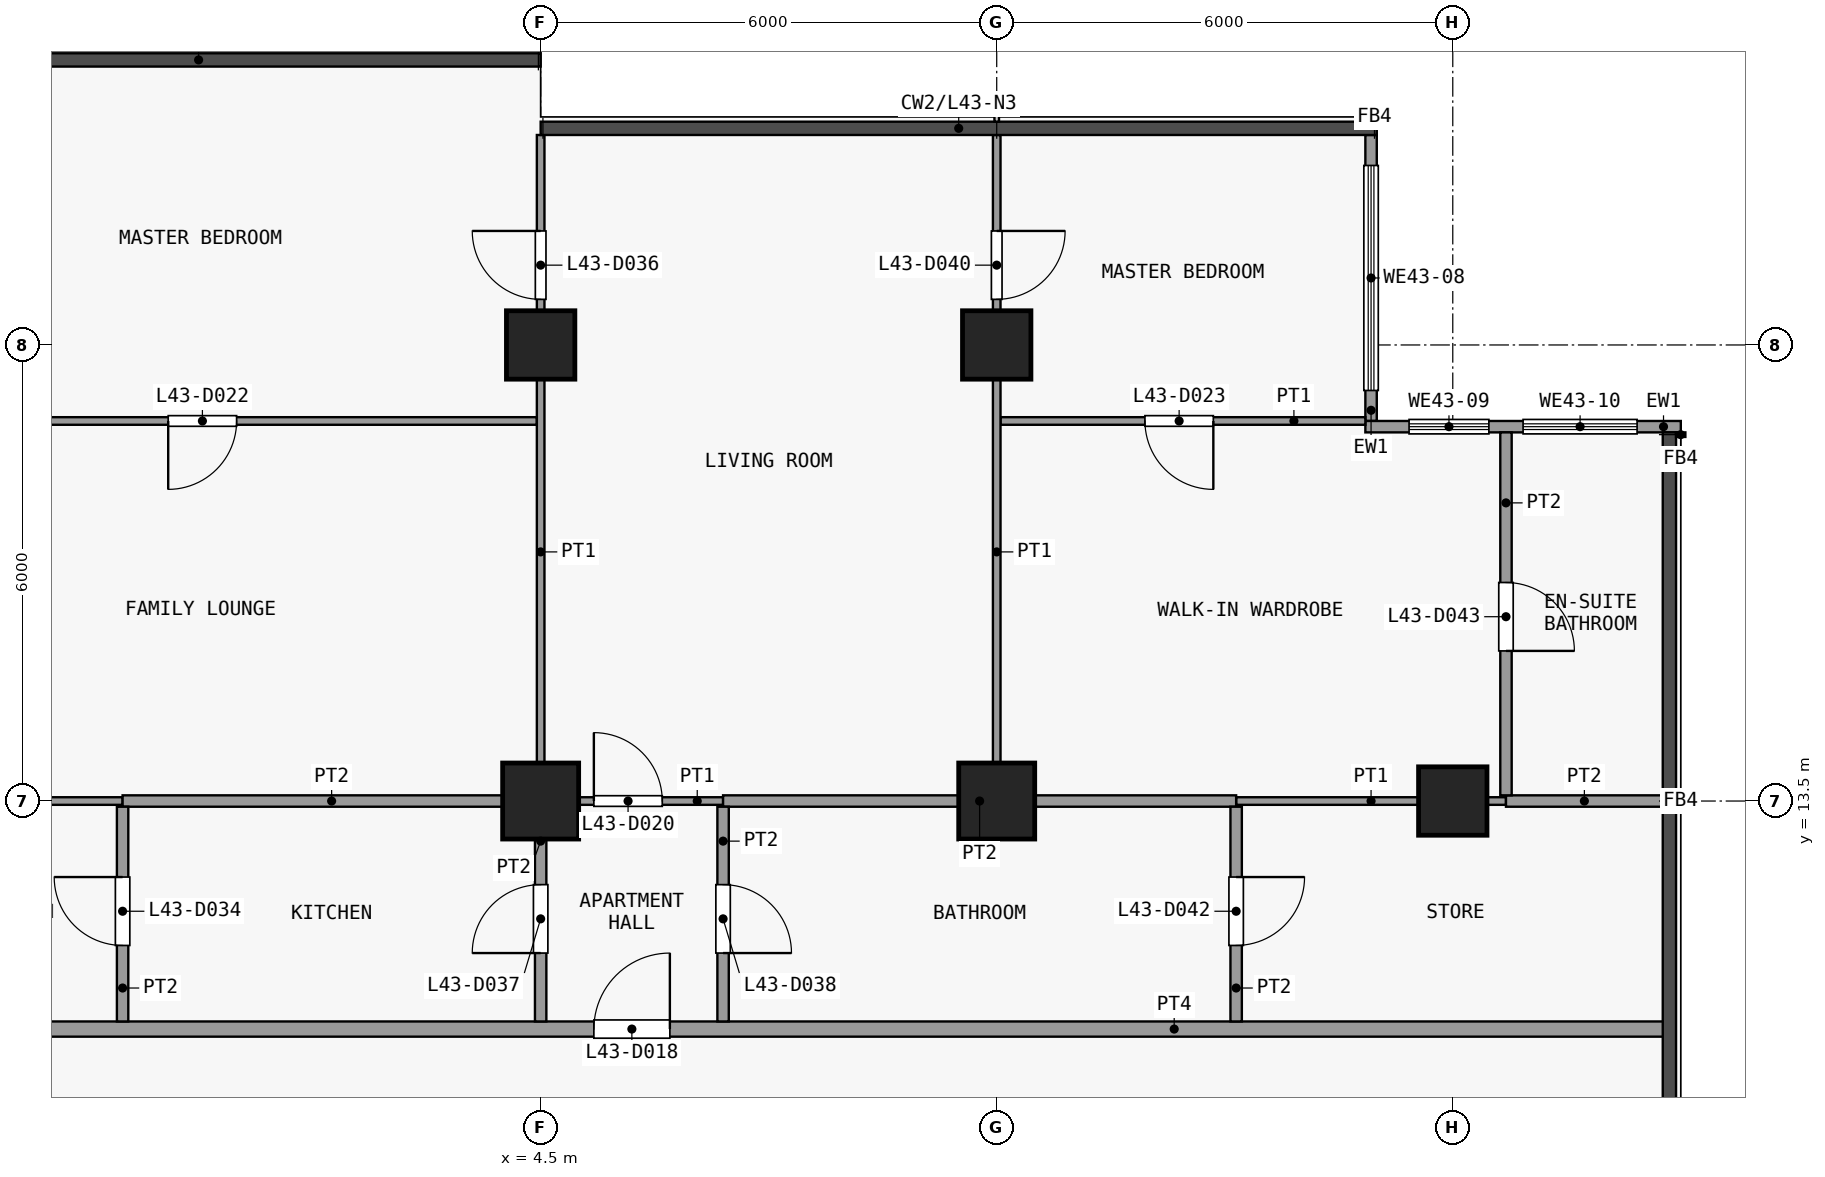
"""IFC4 building model, lengths in metres.
Left out: names, types, materials, properties, quantities, classifications, styles, units other than length and angle.
Written with IfcOpenShell. Run it as: python <this file> out.ifc"""

import sys

from ifc_helpers import new_model, si_unit, direction, frame, frame_2d, origin, origin_2d, place, context, subcontext, project, spatial, rectangle, extrude, element, fill, save


model = new_model("IFC4")
c1 = context("Model", 3, precision=1e-05, world=origin(), true_north=direction((0.0, 1.0)))
c2 = subcontext(c1, "Body", "Model", "MODEL_VIEW")
j1 = project(units=[si_unit("LENGTHUNIT", "METRE"), si_unit("PLANEANGLEUNIT", "RADIAN")], contexts=[c1])
p1 = place(None, origin())
s1 = spatial("IfcSite", under=j1, at=p1, CompositionType="ELEMENT")
p2 = place(p1, origin())
s2 = spatial("IfcBuilding", under=s1, at=p2, CompositionType="ELEMENT")
p3 = place(p2, frame((0.0, 0.0, 174.5)))
s3 = spatial("IfcBuildingStorey", under=s2, at=p3, CompositionType="ELEMENT", Elevation=174.5)
p4 = place(p3, frame((4.5, 13.5, 0.0), z_axis=(0.0, 0.0, 1.0), x_axis=(1.0, 0.0, 0.0)))
e1 = element("IfcColumn", 1, at=p4, inside=s3, PredefinedType="COLUMN", context=c2, shape_type="SweptSolid", body=[
    extrude(rectangle(XDim=1.0, YDim=1.0, at=origin_2d()), origin(), (0.0, 0.0, 1.0), 3.6),
])
p5 = place(p3, frame((4.5, 19.5, 0.0), z_axis=(0.0, 0.0, 1.0), x_axis=(1.0, 0.0, 0.0)))
e2 = element("IfcColumn", 2, at=p5, inside=s3, PredefinedType="COLUMN", context=c2, shape_type="SweptSolid", body=[
    extrude(rectangle(XDim=0.9, YDim=0.9, at=origin_2d()), origin(), (0.0, 0.0, 1.0), 3.6),
])
p6 = place(p3, frame((10.5, 13.5, 0.0), z_axis=(0.0, 0.0, 1.0), x_axis=(1.0, 0.0, 0.0)))
e3 = element("IfcColumn", 3, at=p6, inside=s3, PredefinedType="COLUMN", context=c2, shape_type="SweptSolid", body=[
    extrude(rectangle(XDim=1.0, YDim=1.0, at=origin_2d()), origin(), (0.0, 0.0, 1.0), 3.6),
])
for number, where, z_axis, x_axis in (
    (4, (10.5, 19.5, 0.0), (0.0, 0.0, 1.0), (1.0, 0.0, 0.0)),
    (5, (16.5, 13.5, 0.0), (0.0, 0.0, 1.0), (1.0, 0.0, 0.0)),
):
    element("IfcColumn", number, at=place(p3, frame(where, z_axis=z_axis, x_axis=x_axis)), inside=s3, PredefinedType="COLUMN", context=c2, shape_type="SweptSolid", body=[
        extrude(rectangle(XDim=0.9, YDim=0.9, at=origin_2d()), origin(), (0.0, 0.0, 1.0), 3.6),
    ])
p7 = place(p3, frame((15.425, 22.262, 0.0), z_axis=(0.0, 0.0, 1.0), x_axis=(0.0, -1.0, 0.0)))
e6 = element("IfcWall", 6, at=p7, inside=s3, PredefinedType="SOLIDWALL", context=c2, shape_type="SweptSolid", body=[
    extrude(rectangle(XDim=3.762, YDim=0.15, at=frame_2d((1.881, 0.0))), origin(), (0.0, 0.0, 1.0), 3.3),
])
p8 = place(p7, frame((0.401, 0.0, 0.9)))
e7 = element("IfcOpeningElement", 7, at=p8, cuts=e6, PredefinedType="OPENING", context=c2, shape_type="SweptSolid", body=[
    extrude(rectangle(XDim=2.96, YDim=2.4, at=frame_2d((1.48, 1.2))), frame((0.0, 0.085, 0.0), z_axis=(0.0, -1.0, 0.0), x_axis=(1.0, 0.0, 0.0)), (0.0, 0.0, 1.0), 0.17),
])
p9 = place(p3, frame((15.35, 18.425, 0.0), z_axis=(0.0, 0.0, 1.0), x_axis=(1.0, 0.0, 0.0)))
e8 = element("IfcWall", 8, at=p9, inside=s3, PredefinedType="SOLIDWALL", context=c2, shape_type="SweptSolid", body=[
    extrude(rectangle(XDim=4.15, YDim=0.15, at=frame_2d((2.075, 0.0))), origin(), (0.0, 0.0, 1.0), 3.3),
])
p10 = place(p9, frame((0.575, 0.0, 0.9)))
e9 = element("IfcOpeningElement", 9, at=p10, cuts=e8, PredefinedType="OPENING", context=c2, shape_type="SweptSolid", body=[
    extrude(rectangle(XDim=1.05, YDim=2.4, at=frame_2d((0.525, 1.2))), frame((0.0, 0.085, 0.0), z_axis=(0.0, -1.0, 0.0), x_axis=(1.0, 0.0, 0.0)), (0.0, 0.0, 1.0), 0.17),
])
p11 = place(p9, frame((2.075, 0.0, 0.9)))
e10 = element("IfcOpeningElement", 10, at=p11, cuts=e8, PredefinedType="OPENING", context=c2, shape_type="SweptSolid", body=[
    extrude(rectangle(XDim=1.5, YDim=2.4, at=frame_2d((0.75, 1.2))), frame((0.0, 0.085, 0.0), z_axis=(0.0, -1.0, 0.0), x_axis=(1.0, 0.0, 0.0)), (0.0, 0.0, 1.0), 0.17),
])
p12 = place(p3, frame((-19.35, 10.5, 0.0), z_axis=(0.0, 0.0, 1.0), x_axis=(1.0, 0.0, 0.0)))
e11 = element("IfcWall", 11, at=p12, inside=s3, PredefinedType="PARTITIONING", context=c2, shape_type="SweptSolid", body=[
    extrude(rectangle(XDim=38.7, YDim=0.2, at=frame_2d((19.35, 0.0))), origin(), (0.0, 0.0, 1.0), 3.3),
])
p13 = place(p12, frame((10.55, 0.0, 0.0)))
e12 = element("IfcOpeningElement", 12, at=p13, cuts=e11, PredefinedType="OPENING", context=c2, shape_type="SweptSolid", body=[
    extrude(rectangle(XDim=1.0, YDim=2.1, at=frame_2d((0.5, 1.05))), frame((0.0, 0.11, 0.0), z_axis=(0.0, -1.0, 0.0), x_axis=(1.0, 0.0, 0.0)), (0.0, 0.0, 1.0), 0.22),
])
p14 = place(p12, frame((24.55, 0.0, 0.0)))
e13 = element("IfcOpeningElement", 13, at=p14, cuts=e11, PredefinedType="OPENING", context=c2, shape_type="SweptSolid", body=[
    extrude(rectangle(XDim=1.0, YDim=2.1, at=frame_2d((0.5, 1.05))), frame((0.0, 0.11, 0.0), z_axis=(0.0, -1.0, 0.0), x_axis=(1.0, 0.0, 0.0)), (0.0, 0.0, 1.0), 0.22),
])
p15 = place(p3, frame((-4.5, 13.5, 0.0), z_axis=(0.0, 0.0, 1.0), x_axis=(1.0, 0.0, 0.0)))
e14 = element("IfcWall", 14, at=p15, inside=s3, PredefinedType="PARTITIONING", context=c2, shape_type="SweptSolid", body=[
    extrude(rectangle(XDim=3.5, YDim=0.1, at=frame_2d((1.75, 0.0))), origin(), (0.0, 0.0, 1.0), 3.3),
])
p16 = place(p3, frame((4.5, 13.5, 0.0), z_axis=(0.0, 0.0, 1.0), x_axis=(1.0, 0.0, 0.0)))
e15 = element("IfcWall", 15, at=p16, inside=s3, PredefinedType="PARTITIONING", context=c2, shape_type="SweptSolid", body=[
    extrude(rectangle(XDim=2.4, YDim=0.1, at=frame_2d((1.2, 0.0))), origin(), (0.0, 0.0, 1.0), 3.3),
])
p17 = place(p16, frame((0.7, 0.0, 0.0)))
e16 = element("IfcOpeningElement", 16, at=p17, cuts=e15, PredefinedType="OPENING", context=c2, shape_type="SweptSolid", body=[
    extrude(rectangle(XDim=0.9, YDim=2.1, at=frame_2d((0.45, 1.05))), frame((0.0, 0.06, 0.0), z_axis=(0.0, -1.0, 0.0), x_axis=(1.0, 0.0, 0.0)), (0.0, 0.0, 1.0), 0.12),
])
p18 = place(p3, frame((13.65, 13.5, 0.0), z_axis=(0.0, 0.0, 1.0), x_axis=(1.0, 0.0, 0.0)))
e17 = element("IfcWall", 17, at=p18, inside=s3, PredefinedType="PARTITIONING", context=c2, shape_type="SweptSolid", body=[
    extrude(rectangle(XDim=3.55, YDim=0.1, at=frame_2d((1.775, 0.0))), origin(), (0.0, 0.0, 1.0), 3.3),
])
p19 = place(p3, frame((-1.0, 13.5, 0.0), z_axis=(0.0, 0.0, 1.0), x_axis=(1.0, 0.0, 0.0)))
e18 = element("IfcWall", 18, at=p19, inside=s3, PredefinedType="PARTITIONING", context=c2, shape_type="SweptSolid", body=[
    extrude(rectangle(XDim=5.5, YDim=0.15, at=frame_2d((2.75, 0.0))), origin(), (0.0, 0.0, 1.0), 3.3),
])
p20 = place(p3, frame((6.9, 13.5, 0.0), z_axis=(0.0, 0.0, 1.0), x_axis=(1.0, 0.0, 0.0)))
e19 = element("IfcWall", 19, at=p20, inside=s3, PredefinedType="PARTITIONING", context=c2, shape_type="SweptSolid", body=[
    extrude(rectangle(XDim=6.75, YDim=0.15, at=frame_2d((3.375, 0.0))), origin(), (0.0, 0.0, 1.0), 3.3),
])
p21 = place(p3, frame((17.2, 13.5, 0.0), z_axis=(0.0, 0.0, 1.0), x_axis=(1.0, 0.0, 0.0)))
e20 = element("IfcWall", 20, at=p21, inside=s3, PredefinedType="PARTITIONING", context=c2, shape_type="SweptSolid", body=[
    extrude(rectangle(XDim=2.062, YDim=0.15, at=frame_2d((1.031, 0.0))), origin(), (0.0, 0.0, 1.0), 3.3),
])
p22 = place(p3, frame((-4.4, 18.5, 0.0), z_axis=(0.0, 0.0, 1.0), x_axis=(1.0, 0.0, 0.0)))
e21 = element("IfcWall", 21, at=p22, inside=s3, PredefinedType="PARTITIONING", context=c2, shape_type="SweptSolid", body=[
    extrude(rectangle(XDim=8.85, YDim=0.1, at=frame_2d((4.425, 0.0))), origin(), (0.0, 0.0, 1.0), 3.3),
])
p23 = place(p22, frame((4.0, 0.0, 0.0)))
e22 = element("IfcOpeningElement", 22, at=p23, cuts=e21, PredefinedType="OPENING", context=c2, shape_type="SweptSolid", body=[
    extrude(rectangle(XDim=0.9, YDim=2.1, at=frame_2d((0.45, 1.05))), frame((0.0, 0.06, 0.0), z_axis=(0.0, -1.0, 0.0), x_axis=(1.0, 0.0, 0.0)), (0.0, 0.0, 1.0), 0.12),
])
p24 = place(p3, frame((10.55, 18.5, 0.0), z_axis=(0.0, 0.0, 1.0), x_axis=(1.0, 0.0, 0.0)))
e23 = element("IfcWall", 23, at=p24, inside=s3, PredefinedType="PARTITIONING", context=c2, shape_type="SweptSolid", body=[
    extrude(rectangle(XDim=4.8, YDim=0.1, at=frame_2d((2.4, 0.0))), origin(), (0.0, 0.0, 1.0), 3.3),
])
p25 = place(p24, frame((1.9, 0.0, 0.0)))
e24 = element("IfcOpeningElement", 24, at=p25, cuts=e23, PredefinedType="OPENING", context=c2, shape_type="SweptSolid", body=[
    extrude(rectangle(XDim=0.9, YDim=2.1, at=frame_2d((0.45, 1.05))), frame((0.0, 0.06, 0.0), z_axis=(0.0, -1.0, 0.0), x_axis=(1.0, 0.0, 0.0)), (0.0, 0.0, 1.0), 0.12),
])
p26 = place(p3, frame((-1.0, 10.6, 0.0), z_axis=(0.0, 0.0, 1.0), x_axis=(0.0, 1.0, 0.0)))
e25 = element("IfcWall", 25, at=p26, inside=s3, PredefinedType="PARTITIONING", context=c2, shape_type="SweptSolid", body=[
    extrude(rectangle(XDim=2.825, YDim=0.15, at=frame_2d((1.413, 0.0))), origin(), (0.0, 0.0, 1.0), 3.3),
])
p27 = place(p26, frame((1.0, 0.0, 0.0)))
e26 = element("IfcOpeningElement", 26, at=p27, cuts=e25, PredefinedType="OPENING", context=c2, shape_type="SweptSolid", body=[
    extrude(rectangle(XDim=0.9, YDim=2.1, at=frame_2d((0.45, 1.05))), frame((0.0, 0.085, 0.0), z_axis=(0.0, -1.0, 0.0), x_axis=(1.0, 0.0, 0.0)), (0.0, 0.0, 1.0), 0.17),
])
p28 = place(p3, frame((4.5, 13.575, 0.0), z_axis=(0.0, 0.0, 1.0), x_axis=(0.0, 1.0, 0.0)))
e27 = element("IfcWall", 27, at=p28, inside=s3, PredefinedType="PARTITIONING", context=c2, shape_type="SweptSolid", body=[
    extrude(rectangle(XDim=8.688, YDim=0.1, at=frame_2d((4.344, 0.0))), origin(), (0.0, 0.0, 1.0), 3.3),
])
p29 = place(p28, frame((6.525, 0.0, 0.0)))
e28 = element("IfcOpeningElement", 28, at=p29, cuts=e27, PredefinedType="OPENING", context=c2, shape_type="SweptSolid", body=[
    extrude(rectangle(XDim=0.9, YDim=2.1, at=frame_2d((0.45, 1.05))), frame((0.0, 0.06, 0.0), z_axis=(0.0, -1.0, 0.0), x_axis=(1.0, 0.0, 0.0)), (0.0, 0.0, 1.0), 0.12),
])
p30 = place(p3, frame((4.5, 10.6, 0.0), z_axis=(0.0, 0.0, 1.0), x_axis=(0.0, 1.0, 0.0)))
e29 = element("IfcWall", 29, at=p30, inside=s3, PredefinedType="PARTITIONING", context=c2, shape_type="SweptSolid", body=[
    extrude(rectangle(XDim=2.825, YDim=0.15, at=frame_2d((1.413, 0.0))), origin(), (0.0, 0.0, 1.0), 3.3),
])
p31 = place(p30, frame((0.9, 0.0, 0.0)))
e30 = element("IfcOpeningElement", 30, at=p31, cuts=e29, PredefinedType="OPENING", context=c2, shape_type="SweptSolid", body=[
    extrude(rectangle(XDim=0.9, YDim=2.1, at=frame_2d((0.45, 1.05))), frame((0.0, 0.085, 0.0), z_axis=(0.0, -1.0, 0.0), x_axis=(1.0, 0.0, 0.0)), (0.0, 0.0, 1.0), 0.17),
])
p32 = place(p3, frame((6.9, 10.6, 0.0), z_axis=(0.0, 0.0, 1.0), x_axis=(0.0, 1.0, 0.0)))
e31 = element("IfcWall", 31, at=p32, inside=s3, PredefinedType="PARTITIONING", context=c2, shape_type="SweptSolid", body=[
    extrude(rectangle(XDim=2.825, YDim=0.15, at=frame_2d((1.413, 0.0))), origin(), (0.0, 0.0, 1.0), 3.3),
])
p33 = place(p32, frame((0.9, 0.0, 0.0)))
e32 = element("IfcOpeningElement", 32, at=p33, cuts=e31, PredefinedType="OPENING", context=c2, shape_type="SweptSolid", body=[
    extrude(rectangle(XDim=0.9, YDim=2.1, at=frame_2d((0.45, 1.05))), frame((0.0, 0.085, 0.0), z_axis=(0.0, -1.0, 0.0), x_axis=(1.0, 0.0, 0.0)), (0.0, 0.0, 1.0), 0.17),
])
p34 = place(p3, frame((10.5, 13.575, 0.0), z_axis=(0.0, 0.0, 1.0), x_axis=(0.0, 1.0, 0.0)))
e33 = element("IfcWall", 33, at=p34, inside=s3, PredefinedType="PARTITIONING", context=c2, shape_type="SweptSolid", body=[
    extrude(rectangle(XDim=8.688, YDim=0.1, at=frame_2d((4.344, 0.0))), origin(), (0.0, 0.0, 1.0), 3.3),
])
p35 = place(p34, frame((6.525, 0.0, 0.0)))
e34 = element("IfcOpeningElement", 34, at=p35, cuts=e33, PredefinedType="OPENING", context=c2, shape_type="SweptSolid", body=[
    extrude(rectangle(XDim=0.9, YDim=2.1, at=frame_2d((0.45, 1.05))), frame((0.0, 0.06, 0.0), z_axis=(0.0, -1.0, 0.0), x_axis=(1.0, 0.0, 0.0)), (0.0, 0.0, 1.0), 0.12),
])
p36 = place(p3, frame((13.65, 10.6, 0.0), z_axis=(0.0, 0.0, 1.0), x_axis=(0.0, 1.0, 0.0)))
e35 = element("IfcWall", 35, at=p36, inside=s3, PredefinedType="PARTITIONING", context=c2, shape_type="SweptSolid", body=[
    extrude(rectangle(XDim=2.825, YDim=0.15, at=frame_2d((1.413, 0.0))), origin(), (0.0, 0.0, 1.0), 3.3),
])
p37 = place(p36, frame((1.0, 0.0, 0.0)))
e36 = element("IfcOpeningElement", 36, at=p37, cuts=e35, PredefinedType="OPENING", context=c2, shape_type="SweptSolid", body=[
    extrude(rectangle(XDim=0.9, YDim=2.1, at=frame_2d((0.45, 1.05))), frame((0.0, 0.085, 0.0), z_axis=(0.0, -1.0, 0.0), x_axis=(1.0, 0.0, 0.0)), (0.0, 0.0, 1.0), 0.17),
])
p38 = place(p3, frame((17.2, 13.575, 0.0), z_axis=(0.0, 0.0, 1.0), x_axis=(0.0, 1.0, 0.0)))
e37 = element("IfcWall", 37, at=p38, inside=s3, PredefinedType="PARTITIONING", context=c2, shape_type="SweptSolid", body=[
    extrude(rectangle(XDim=4.775, YDim=0.15, at=frame_2d((2.388, 0.0))), origin(), (0.0, 0.0, 1.0), 3.3),
])
p39 = place(p38, frame((1.9, 0.0, 0.0)))
e38 = element("IfcOpeningElement", 38, at=p39, cuts=e37, PredefinedType="OPENING", context=c2, shape_type="SweptSolid", body=[
    extrude(rectangle(XDim=0.9, YDim=2.1, at=frame_2d((0.45, 1.05))), frame((0.0, 0.085, 0.0), z_axis=(0.0, -1.0, 0.0), x_axis=(1.0, 0.0, 0.0)), (0.0, 0.0, 1.0), 0.17),
])
p40 = place(p8, origin())
e39 = element("IfcWindow", 39, at=p40, inside=s3, PartitioningType="SINGLE_PANEL", PredefinedType="WINDOW", context=c2, shape_type="SweptSolid", body=[
    extrude(rectangle(XDim=2.96, YDim=2.4, at=frame_2d((1.48, 1.2))), frame((0.0, 0.03, 0.0), z_axis=(0.0, -1.0, 0.0), x_axis=(1.0, 0.0, 0.0)), (0.0, 0.0, 1.0), 0.06),
])
fill(e7, e39)
p41 = place(p10, origin())
e40 = element("IfcWindow", 40, at=p41, inside=s3, PartitioningType="SINGLE_PANEL", PredefinedType="WINDOW", context=c2, shape_type="SweptSolid", body=[
    extrude(rectangle(XDim=1.05, YDim=2.4, at=frame_2d((0.525, 1.2))), frame((0.0, 0.03, 0.0), z_axis=(0.0, -1.0, 0.0), x_axis=(1.0, 0.0, 0.0)), (0.0, 0.0, 1.0), 0.06),
])
fill(e9, e40)
p42 = place(p11, origin())
e41 = element("IfcWindow", 41, at=p42, inside=s3, PartitioningType="SINGLE_PANEL", PredefinedType="WINDOW", context=c2, shape_type="SweptSolid", body=[
    extrude(rectangle(XDim=1.5, YDim=2.4, at=frame_2d((0.75, 1.2))), frame((0.0, 0.03, 0.0), z_axis=(0.0, -1.0, 0.0), x_axis=(1.0, 0.0, 0.0)), (0.0, 0.0, 1.0), 0.06),
])
fill(e10, e41)
p43 = place(p14, origin())
e42 = element("IfcDoor", 42, at=p43, inside=s3, OperationType="SINGLE_SWING_LEFT", PredefinedType="DOOR", context=c2, shape_type="SweptSolid", body=[
    extrude(rectangle(XDim=1.0, YDim=2.1, at=frame_2d((0.5, 1.05))), frame((0.0, 0.025, 0.0), z_axis=(0.0, -1.0, 0.0), x_axis=(1.0, 0.0, 0.0)), (0.0, 0.0, 1.0), 0.05),
])
fill(e13, e42)
p44 = place(p17, origin())
e43 = element("IfcDoor", 43, at=p44, inside=s3, OperationType="SINGLE_SWING_RIGHT", PredefinedType="DOOR", context=c2, shape_type="SweptSolid", body=[
    extrude(rectangle(XDim=0.9, YDim=2.1, at=frame_2d((0.45, 1.05))), frame((0.0, 0.025, 0.0), z_axis=(0.0, -1.0, 0.0), x_axis=(1.0, 0.0, 0.0)), (0.0, 0.0, 1.0), 0.05),
])
fill(e16, e43)
p45 = place(p23, origin())
e44 = element("IfcDoor", 44, at=p45, inside=s3, OperationType="SINGLE_SWING_LEFT", PredefinedType="DOOR", context=c2, shape_type="SweptSolid", body=[
    extrude(rectangle(XDim=0.9, YDim=2.1, at=frame_2d((0.45, 1.05))), frame((0.0, 0.025, 0.0), z_axis=(0.0, -1.0, 0.0), x_axis=(1.0, 0.0, 0.0)), (0.0, 0.0, 1.0), 0.05),
])
fill(e22, e44)
p46 = place(p25, origin())
e45 = element("IfcDoor", 45, at=p46, inside=s3, OperationType="SINGLE_SWING_RIGHT", PredefinedType="DOOR", context=c2, shape_type="SweptSolid", body=[
    extrude(rectangle(XDim=0.9, YDim=2.1, at=frame_2d((0.45, 1.05))), frame((0.0, 0.025, 0.0), z_axis=(0.0, -1.0, 0.0), x_axis=(1.0, 0.0, 0.0)), (0.0, 0.0, 1.0), 0.05),
])
fill(e24, e45)
p47 = place(p27, origin())
e46 = element("IfcDoor", 46, at=p47, inside=s3, OperationType="SINGLE_SWING_LEFT", PredefinedType="DOOR", context=c2, shape_type="SweptSolid", body=[
    extrude(rectangle(XDim=0.9, YDim=2.1, at=frame_2d((0.45, 1.05))), frame((0.0, 0.025, 0.0), z_axis=(0.0, -1.0, 0.0), x_axis=(1.0, 0.0, 0.0)), (0.0, 0.0, 1.0), 0.05),
])
fill(e26, e46)
p48 = place(p29, origin())
e47 = element("IfcDoor", 47, at=p48, inside=s3, OperationType="SINGLE_SWING_LEFT", PredefinedType="DOOR", context=c2, shape_type="SweptSolid", body=[
    extrude(rectangle(XDim=0.9, YDim=2.1, at=frame_2d((0.45, 1.05))), frame((0.0, 0.025, 0.0), z_axis=(0.0, -1.0, 0.0), x_axis=(1.0, 0.0, 0.0)), (0.0, 0.0, 1.0), 0.05),
])
fill(e28, e47)
p49 = place(p31, origin())
e48 = element("IfcDoor", 48, at=p49, inside=s3, OperationType="SINGLE_SWING_RIGHT", PredefinedType="DOOR", context=c2, shape_type="SweptSolid", body=[
    extrude(rectangle(XDim=0.9, YDim=2.1, at=frame_2d((0.45, 1.05))), frame((0.0, 0.025, 0.0), z_axis=(0.0, -1.0, 0.0), x_axis=(1.0, 0.0, 0.0)), (0.0, 0.0, 1.0), 0.05),
])
fill(e30, e48)
p50 = place(p33, origin())
e49 = element("IfcDoor", 49, at=p50, inside=s3, OperationType="SINGLE_SWING_LEFT", PredefinedType="DOOR", context=c2, shape_type="SweptSolid", body=[
    extrude(rectangle(XDim=0.9, YDim=2.1, at=frame_2d((0.45, 1.05))), frame((0.0, 0.025, 0.0), z_axis=(0.0, -1.0, 0.0), x_axis=(1.0, 0.0, 0.0)), (0.0, 0.0, 1.0), 0.05),
])
fill(e32, e49)
p51 = place(p35, origin())
e50 = element("IfcDoor", 50, at=p51, inside=s3, OperationType="SINGLE_SWING_RIGHT", PredefinedType="DOOR", context=c2, shape_type="SweptSolid", body=[
    extrude(rectangle(XDim=0.9, YDim=2.1, at=frame_2d((0.45, 1.05))), frame((0.0, 0.025, 0.0), z_axis=(0.0, -1.0, 0.0), x_axis=(1.0, 0.0, 0.0)), (0.0, 0.0, 1.0), 0.05),
])
fill(e34, e50)
p52 = place(p37, origin())
e51 = element("IfcDoor", 51, at=p52, inside=s3, OperationType="SINGLE_SWING_RIGHT", PredefinedType="DOOR", context=c2, shape_type="SweptSolid", body=[
    extrude(rectangle(XDim=0.9, YDim=2.1, at=frame_2d((0.45, 1.05))), frame((0.0, 0.025, 0.0), z_axis=(0.0, -1.0, 0.0), x_axis=(1.0, 0.0, 0.0)), (0.0, 0.0, 1.0), 0.05),
])
fill(e36, e51)
p53 = place(p39, origin())
e52 = element("IfcDoor", 52, at=p53, inside=s3, OperationType="SINGLE_SWING_LEFT", PredefinedType="DOOR", context=c2, shape_type="SweptSolid", body=[
    extrude(rectangle(XDim=0.9, YDim=2.1, at=frame_2d((0.45, 1.05))), frame((0.0, 0.025, 0.0), z_axis=(0.0, -1.0, 0.0), x_axis=(1.0, 0.0, 0.0)), (0.0, 0.0, 1.0), 0.05),
])
fill(e38, e52)
save(model, sys.argv[1])
